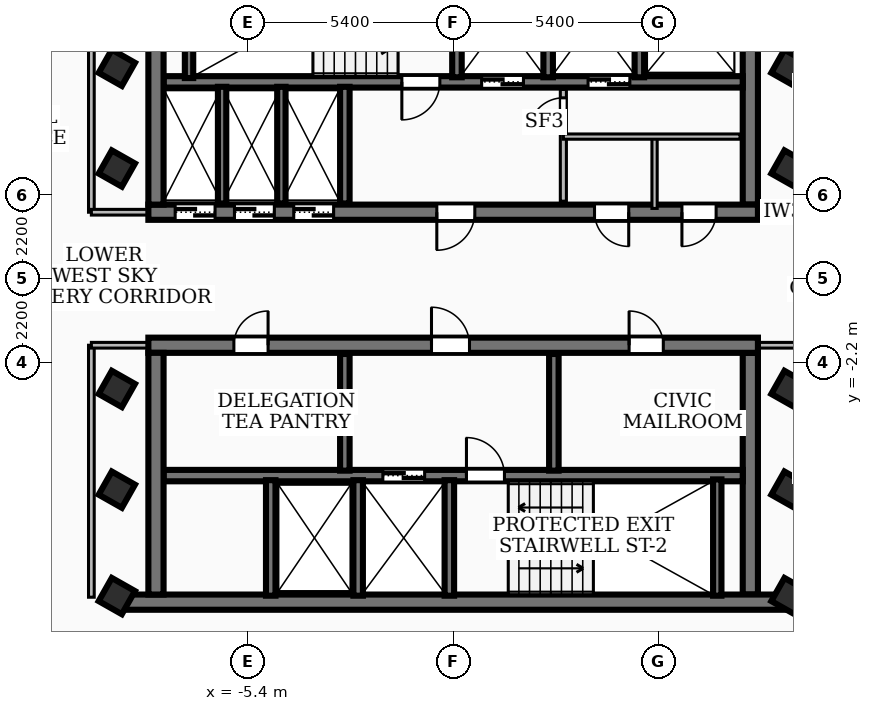
"""IFC4 building model, lengths in metres.
Left out: names, types, materials, properties, quantities, classifications, styles, units other than length and angle.
Written with IfcOpenShell. Run it as: python <this file> out.ifc"""

import sys

from ifc_helpers import new_model, si_unit, direction, frame, frame_2d, origin, origin_2d, place, context, subcontext, project, spatial, rectangle, extrude, element, fill, save


model = new_model("IFC4")
c1 = context("Model", 3, precision=1e-05, world=origin(), true_north=direction((0.0, 1.0)))
c2 = subcontext(c1, "Body", "Model", "MODEL_VIEW")
j1 = project(units=[si_unit("LENGTHUNIT", "METRE"), si_unit("PLANEANGLEUNIT", "RADIAN")], contexts=[c1])
p1 = place(None, origin())
s1 = spatial("IfcSite", under=j1, at=p1, CompositionType="ELEMENT")
p2 = place(p1, origin())
s2 = spatial("IfcBuilding", under=s1, at=p2, CompositionType="ELEMENT")
p3 = place(p2, frame((0.0, 0.0, 278.28)))
s3 = spatial("IfcBuildingStorey", under=s2, at=p3, CompositionType="ELEMENT", Elevation=278.28)
p4 = place(p3, frame((8.02, 1.75, 0.0), z_axis=(0.0, 0.0, 1.0), x_axis=(-1.0, 0.0, 0.0)))
e1 = element("IfcWall", 1, at=p4, inside=s3, PredefinedType="SHEAR", context=c2, shape_type="SweptSolid", body=[
    extrude(rectangle(XDim=16.04, YDim=0.4, at=frame_2d((8.02, 0.0))), origin(), (0.0, 0.0, 1.0), 3.16),
])
p5 = place(p4, frame((7.45, 0.0, 0.0)))
e2 = element("IfcOpeningElement", 2, at=p5, cuts=e1, PredefinedType="OPENING", context=c2, shape_type="SweptSolid", body=[
    extrude(rectangle(XDim=1.0, YDim=2.1, at=frame_2d((0.5, 1.05))), frame((0.0, 0.21, 0.0), z_axis=(0.0, -1.0, 0.0), x_axis=(1.0, 0.0, 0.0)), (0.0, 0.0, 1.0), 0.42),
])
p6 = place(p4, frame((14.285, 0.0, 0.0)))
e3 = element("IfcOpeningElement", 3, at=p6, cuts=e1, PredefinedType="OPENING", context=c2, shape_type="SweptSolid", body=[
    extrude(rectangle(XDim=1.05, YDim=2.15, at=frame_2d((0.525, 1.075))), frame((0.0, 0.21, 0.0), z_axis=(0.0, -1.0, 0.0), x_axis=(1.0, 0.0, 0.0)), (0.0, 0.0, 1.0), 0.42),
])
p7 = place(p4, frame((12.725, 0.0, 0.0)))
e4 = element("IfcOpeningElement", 4, at=p7, cuts=e1, PredefinedType="OPENING", context=c2, shape_type="SweptSolid", body=[
    extrude(rectangle(XDim=1.05, YDim=2.15, at=frame_2d((0.525, 1.075))), frame((0.0, 0.21, 0.0), z_axis=(0.0, -1.0, 0.0), x_axis=(1.0, 0.0, 0.0)), (0.0, 0.0, 1.0), 0.42),
])
p8 = place(p4, frame((11.165, 0.0, 0.0)))
e5 = element("IfcOpeningElement", 5, at=p8, cuts=e1, PredefinedType="OPENING", context=c2, shape_type="SweptSolid", body=[
    extrude(rectangle(XDim=1.05, YDim=2.15, at=frame_2d((0.525, 1.075))), frame((0.0, 0.21, 0.0), z_axis=(0.0, -1.0, 0.0), x_axis=(1.0, 0.0, 0.0)), (0.0, 0.0, 1.0), 0.42),
])
p9 = place(p4, frame((3.4, 0.0, 0.0)))
e6 = element("IfcOpeningElement", 6, at=p9, cuts=e1, PredefinedType="OPENING", context=c2, shape_type="SweptSolid", body=[
    extrude(rectangle(XDim=0.9, YDim=2.06, at=frame_2d((0.45, 1.03))), frame((0.0, 0.21, 0.0), z_axis=(0.0, -1.0, 0.0), x_axis=(1.0, 0.0, 0.0)), (0.0, 0.0, 1.0), 0.42),
])
p10 = place(p4, frame((1.1, 0.0, 0.0)))
e7 = element("IfcOpeningElement", 7, at=p10, cuts=e1, PredefinedType="OPENING", context=c2, shape_type="SweptSolid", body=[
    extrude(rectangle(XDim=0.9, YDim=2.06, at=frame_2d((0.45, 1.03))), frame((0.0, 0.21, 0.0), z_axis=(0.0, -1.0, 0.0), x_axis=(1.0, 0.0, 0.0)), (0.0, 0.0, 1.0), 0.42),
])
for number, where, z_axis, x_axis in (
    (8, (-7.82, 1.95, 0.0), (0.0, 0.0, 1.0), (0.0, 1.0, 0.0)),
    (9, (7.82, 8.31, 0.0), (0.0, 0.0, 1.0), (0.0, -1.0, 0.0)),
):
    element("IfcWall", number, at=place(p3, frame(where, z_axis=z_axis, x_axis=x_axis)), inside=s3, PredefinedType="SHEAR", context=c2, shape_type="SweptSolid", body=[
        extrude(rectangle(XDim=6.36, YDim=0.4, at=frame_2d((3.18, 0.0))), origin(), (0.0, 0.0, 1.0), 3.16),
    ])
p11 = place(p3, frame((7.62, 5.18, 0.0), z_axis=(0.0, 0.0, 1.0), x_axis=(-1.0, 0.0, 0.0)))
e10 = element("IfcWall", 10, at=p11, inside=s3, PredefinedType="SOLIDWALL", context=c2, shape_type="SweptSolid", body=[
    extrude(rectangle(XDim=15.24, YDim=0.3, at=frame_2d((7.62, 0.0))), origin(), (0.0, 0.0, 1.0), 3.16),
])
p12 = place(p11, frame((5.77, 0.0, 0.0)))
e11 = element("IfcOpeningElement", 11, at=p12, cuts=e10, PredefinedType="OPENING", context=c2, shape_type="SweptSolid", body=[
    extrude(rectangle(XDim=1.1, YDim=2.15, at=frame_2d((0.55, 1.075))), frame((0.0, 0.16, 0.0), z_axis=(0.0, -1.0, 0.0), x_axis=(1.0, 0.0, 0.0)), (0.0, 0.0, 1.0), 0.32),
])
p13 = place(p11, frame((2.97, 0.0, 0.0)))
e12 = element("IfcOpeningElement", 12, at=p13, cuts=e10, PredefinedType="OPENING", context=c2, shape_type="SweptSolid", body=[
    extrude(rectangle(XDim=1.1, YDim=2.15, at=frame_2d((0.55, 1.075))), frame((0.0, 0.16, 0.0), z_axis=(0.0, -1.0, 0.0), x_axis=(1.0, 0.0, 0.0)), (0.0, 0.0, 1.0), 0.32),
])
p14 = place(p11, frame((7.97, 0.0, 0.0)))
e13 = element("IfcOpeningElement", 13, at=p14, cuts=e10, PredefinedType="OPENING", context=c2, shape_type="SweptSolid", body=[
    extrude(rectangle(XDim=1.0, YDim=2.1, at=frame_2d((0.5, 1.05))), frame((0.0, 0.16, 0.0), z_axis=(0.0, -1.0, 0.0), x_axis=(1.0, 0.0, 0.0)), (0.0, 0.0, 1.0), 0.32),
])
p15 = place(p3, frame((8.78, -8.51, 0.0), z_axis=(0.0, 0.0, 1.0), x_axis=(-1.0, 0.0, 0.0)))
e14 = element("IfcWall", 14, at=p15, inside=s3, PredefinedType="SHEAR", context=c2, shape_type="SweptSolid", body=[
    extrude(rectangle(XDim=17.56, YDim=0.4, at=frame_2d((8.78, 0.0))), origin(), (0.0, 0.0, 1.0), 3.16),
])
p16 = place(p3, frame((-8.02, -1.75, 0.0), z_axis=(0.0, 0.0, 1.0), x_axis=(1.0, 0.0, 0.0)))
e15 = element("IfcWall", 15, at=p16, inside=s3, PredefinedType="SHEAR", context=c2, shape_type="SweptSolid", body=[
    extrude(rectangle(XDim=16.04, YDim=0.4, at=frame_2d((8.02, 0.0))), origin(), (0.0, 0.0, 1.0), 3.16),
])
p17 = place(p16, frame((7.45, 0.0, 0.0)))
e16 = element("IfcOpeningElement", 16, at=p17, cuts=e15, PredefinedType="OPENING", context=c2, shape_type="SweptSolid", body=[
    extrude(rectangle(XDim=1.0, YDim=2.1, at=frame_2d((0.5, 1.05))), frame((0.0, 0.21, 0.0), z_axis=(0.0, -1.0, 0.0), x_axis=(1.0, 0.0, 0.0)), (0.0, 0.0, 1.0), 0.42),
])
p18 = place(p16, frame((12.65, 0.0, 0.0)))
e17 = element("IfcOpeningElement", 17, at=p18, cuts=e15, PredefinedType="OPENING", context=c2, shape_type="SweptSolid", body=[
    extrude(rectangle(XDim=0.9, YDim=2.06, at=frame_2d((0.45, 1.03))), frame((0.0, 0.21, 0.0), z_axis=(0.0, -1.0, 0.0), x_axis=(1.0, 0.0, 0.0)), (0.0, 0.0, 1.0), 0.42),
])
p19 = place(p16, frame((2.25, 0.0, 0.0)))
e18 = element("IfcOpeningElement", 18, at=p19, cuts=e15, PredefinedType="OPENING", context=c2, shape_type="SweptSolid", body=[
    extrude(rectangle(XDim=0.9, YDim=2.06, at=frame_2d((0.45, 1.03))), frame((0.0, 0.21, 0.0), z_axis=(0.0, -1.0, 0.0), x_axis=(1.0, 0.0, 0.0)), (0.0, 0.0, 1.0), 0.42),
])
for number, where, z_axis, x_axis in (
    (19, (-7.82, -8.31, 0.0), (0.0, 0.0, 1.0), (0.0, 1.0, 0.0)),
    (20, (7.82, -1.95, 0.0), (0.0, 0.0, 1.0), (0.0, -1.0, 0.0)),
):
    element("IfcWall", number, at=place(p3, frame(where, z_axis=z_axis, x_axis=x_axis)), inside=s3, PredefinedType="SHEAR", context=c2, shape_type="SweptSolid", body=[
        extrude(rectangle(XDim=6.36, YDim=0.4, at=frame_2d((3.18, 0.0))), origin(), (0.0, 0.0, 1.0), 3.16),
    ])
p20 = place(p3, frame((-7.62, -5.18, 0.0), z_axis=(0.0, 0.0, 1.0), x_axis=(1.0, 0.0, 0.0)))
e21 = element("IfcWall", 21, at=p20, inside=s3, PredefinedType="SOLIDWALL", context=c2, shape_type="SweptSolid", body=[
    extrude(rectangle(XDim=15.24, YDim=0.3, at=frame_2d((7.62, 0.0))), origin(), (0.0, 0.0, 1.0), 3.16),
])
p21 = place(p20, frame((5.77, 0.0, 0.0)))
e22 = element("IfcOpeningElement", 22, at=p21, cuts=e21, PredefinedType="OPENING", context=c2, shape_type="SweptSolid", body=[
    extrude(rectangle(XDim=1.1, YDim=2.15, at=frame_2d((0.55, 1.075))), frame((0.0, 0.16, 0.0), z_axis=(0.0, -1.0, 0.0), x_axis=(1.0, 0.0, 0.0)), (0.0, 0.0, 1.0), 0.32),
])
p22 = place(p20, frame((7.97, 0.0, 0.0)))
e23 = element("IfcOpeningElement", 23, at=p22, cuts=e21, PredefinedType="OPENING", context=c2, shape_type="SweptSolid", body=[
    extrude(rectangle(XDim=1.0, YDim=2.1, at=frame_2d((0.5, 1.05))), frame((0.0, 0.16, 0.0), z_axis=(0.0, -1.0, 0.0), x_axis=(1.0, 0.0, 0.0)), (0.0, 0.0, 1.0), 0.32),
])
for number, where, z_axis, x_axis in (
    (24, (-6.95, 5.28, 0.0), (0.0, 0.0, 1.0), (0.0, 1.0, 0.0)),
    (25, (6.95, -8.34, 0.0), (0.0, 0.0, 1.0), (0.0, 1.0, 0.0)),
):
    element("IfcWall", number, at=place(p3, frame(where, z_axis=z_axis, x_axis=x_axis)), inside=s3, PredefinedType="SOLIDWALL", context=c2, shape_type="SweptSolid", body=[
        extrude(rectangle(XDim=3.06, YDim=0.22, at=frame_2d((1.53, 0.0))), origin(), (0.0, 0.0, 1.0), 3.16),
    ])
for number, where, z_axis, x_axis in (
    (26, (0.1, 5.3, 0.0), (0.0, 0.0, 1.0), (0.0, 1.0, 0.0)),
    (27, (2.5, 5.3, 0.0), (0.0, 0.0, 1.0), (0.0, 1.0, 0.0)),
    (28, (4.9, 5.3, 0.0), (0.0, 0.0, 1.0), (0.0, 1.0, 0.0)),
):
    element("IfcWall", number, at=place(p3, frame(where, z_axis=z_axis, x_axis=x_axis)), inside=s3, PredefinedType="SOLIDWALL", context=c2, shape_type="SweptSolid", body=[
        extrude(rectangle(XDim=3.04, YDim=0.25, at=frame_2d((1.52, 0.0))), origin(), (0.0, 0.0, 1.0), 3.16),
    ])
p23 = place(p3, frame((-2.85, 1.98, 0.0), z_axis=(0.0, 0.0, 1.0), x_axis=(0.0, 1.0, 0.0)))
e29 = element("IfcWall", 29, at=p23, inside=s3, PredefinedType="SOLIDWALL", context=c2, shape_type="SweptSolid", body=[
    extrude(rectangle(XDim=3.07, YDim=0.25, at=frame_2d((1.535, 0.0))), origin(), (0.0, 0.0, 1.0), 3.16),
])
for number, where, z_axis, x_axis in (
    (30, (-0.1, -8.34, 0.0), (0.0, 0.0, 1.0), (0.0, 1.0, 0.0)),
    (31, (-2.5, -8.34, 0.0), (0.0, 0.0, 1.0), (0.0, 1.0, 0.0)),
    (32, (-4.8, -8.34, 0.0), (0.0, 0.0, 1.0), (0.0, 1.0, 0.0)),
):
    element("IfcWall", number, at=place(p3, frame(where, z_axis=z_axis, x_axis=x_axis)), inside=s3, PredefinedType="SOLIDWALL", context=c2, shape_type="SweptSolid", body=[
        extrude(rectangle(XDim=3.04, YDim=0.25, at=frame_2d((1.52, 0.0))), origin(), (0.0, 0.0, 1.0), 3.16),
    ])
for number, where, z_axis, x_axis in (
    (33, (-2.85, -5.05, 0.0), (0.0, 0.0, 1.0), (0.0, 1.0, 0.0)),
    (34, (2.65, -5.05, 0.0), (0.0, 0.0, 1.0), (0.0, 1.0, 0.0)),
):
    element("IfcWall", number, at=place(p3, frame(where, z_axis=z_axis, x_axis=x_axis)), inside=s3, PredefinedType="SOLIDWALL", context=c2, shape_type="SweptSolid", body=[
        extrude(rectangle(XDim=3.07, YDim=0.25, at=frame_2d((1.535, 0.0))), origin(), (0.0, 0.0, 1.0), 3.16),
    ])
for number, where, z_axis, x_axis in (
    (35, (-6.08, 1.98, 0.0), (0.0, 0.0, 1.0), (0.0, 1.0, 0.0)),
    (36, (-4.52, 1.98, 0.0), (0.0, 0.0, 1.0), (0.0, 1.0, 0.0)),
):
    element("IfcWall", number, at=place(p3, frame(where, z_axis=z_axis, x_axis=x_axis)), inside=s3, PredefinedType="SOLIDWALL", context=c2, shape_type="SweptSolid", body=[
        extrude(rectangle(XDim=3.07, YDim=0.22, at=frame_2d((1.535, 0.0))), origin(), (0.0, 0.0, 1.0), 3.16),
    ])
for number, where, z_axis, x_axis in (
    (37, (-8.85, -5.55, 0.0), (0.0, 0.0, 1.0), (0.493, 0.87, 0.0)),
    (38, (-8.85, -2.9, 0.0), (0.0, 0.0, 1.0), (0.493, 0.87, 0.0)),
    (39, (-8.85, 2.9, 0.0), (0.0, 0.0, 1.0), (0.493, 0.87, 0.0)),
    (40, (-8.85, 5.55, 0.0), (0.0, 0.0, 1.0), (0.493, 0.87, 0.0)),
    (41, (8.85, -5.55, 0.0), (0.0, 0.0, 1.0), (0.493, 0.87, 0.0)),
    (42, (8.85, -2.9, 0.0), (0.0, 0.0, 1.0), (0.493, 0.87, 0.0)),
    (43, (8.85, 2.9, 0.0), (0.0, 0.0, 1.0), (0.493, 0.87, 0.0)),
    (44, (8.85, 5.55, 0.0), (0.0, 0.0, 1.0), (0.493, 0.87, 0.0)),
    (45, (8.85, -8.35, 0.0), (0.0, 0.0, 1.0), (0.493, 0.87, 0.0)),
    (46, (-8.85, -8.35, 0.0), (0.0, 0.0, 1.0), (0.493, 0.87, 0.0)),
):
    element("IfcColumn", number, at=place(p3, frame(where, z_axis=z_axis, x_axis=x_axis)), inside=s3, PredefinedType="COLUMN", context=c2, shape_type="SweptSolid", body=[
        extrude(rectangle(XDim=0.7, YDim=0.7, at=origin_2d()), origin(), (0.0, 0.0, 1.0), 3.42),
    ])
p24 = place(p3, frame((2.9, 2.04, 0.0), z_axis=(0.0, 0.0, 1.0), x_axis=(0.0, 1.0, 0.0)))
e47 = element("IfcWall", 47, at=p24, inside=s3, PredefinedType="PARTITIONING", context=c2, shape_type="SweptSolid", body=[
    extrude(rectangle(XDim=2.94, YDim=0.16, at=frame_2d((1.47, 0.0))), origin(), (0.0, 0.0, 1.0), 2.39),
])
p25 = place(p24, frame((1.82, 0.0, 0.0)))
e48 = element("IfcOpeningElement", 48, at=p25, cuts=e47, PredefinedType="OPENING", context=c2, shape_type="SweptSolid", body=[
    extrude(rectangle(XDim=0.9, YDim=2.06, at=frame_2d((0.45, 1.03))), frame((0.0, 0.09, 0.0), z_axis=(0.0, -1.0, 0.0), x_axis=(1.0, 0.0, 0.0)), (0.0, 0.0, 1.0), 0.18),
])
p26 = place(p3, frame((2.9, 3.74, 0.0), z_axis=(0.0, 0.0, 1.0), x_axis=(1.0, 0.0, 0.0)))
e49 = element("IfcWall", 49, at=p26, inside=s3, PredefinedType="PARTITIONING", context=c2, shape_type="SweptSolid", body=[
    extrude(rectangle(XDim=4.65, YDim=0.138, at=frame_2d((2.325, 0.0))), origin(), (0.0, 0.0, 1.0), 3.16),
])
p27 = place(p3, frame((5.3, 1.85, 0.0), z_axis=(0.0, 0.0, 1.0), x_axis=(0.0, 1.0, 0.0)))
e50 = element("IfcWall", 50, at=p27, inside=s3, PredefinedType="PARTITIONING", context=c2, shape_type="SweptSolid", body=[
    extrude(rectangle(XDim=1.89, YDim=0.138, at=frame_2d((0.945, 0.0))), origin(), (0.0, 0.0, 1.0), 2.39),
])
p28 = place(p3, frame((-9.52, 1.75, 0.0), z_axis=(0.0, 0.0, 1.0), x_axis=(0.0, 1.0, 0.0)))
e51 = element("IfcWall", 51, at=p28, inside=s3, PredefinedType="PARTITIONING", context=c2, shape_type="SweptSolid", body=[
    extrude(rectangle(XDim=6.63, YDim=0.15, at=frame_2d((3.315, 0.0))), origin(), (0.0, 0.0, 1.0), 2.53),
])
p29 = place(p3, frame((-7.85, 1.75, 0.0), z_axis=(0.0, 0.0, 1.0), x_axis=(-1.0, 0.0, 0.0)))
e52 = element("IfcWall", 52, at=p29, inside=s3, PredefinedType="PARTITIONING", context=c2, shape_type="SweptSolid", body=[
    extrude(rectangle(XDim=1.67, YDim=0.15, at=frame_2d((0.835, 0.0))), origin(), (0.0, 0.0, 1.0), 2.39),
])
p30 = place(p3, frame((-9.52, -8.38, 0.0), z_axis=(0.0, 0.0, 1.0), x_axis=(0.0, 1.0, 0.0)))
e53 = element("IfcWall", 53, at=p30, inside=s3, PredefinedType="PARTITIONING", context=c2, shape_type="SweptSolid", body=[
    extrude(rectangle(XDim=6.63, YDim=0.15, at=frame_2d((3.315, 0.0))), origin(), (0.0, 0.0, 1.0), 3.16),
])
for number, where, z_axis, x_axis in (
    (54, (-7.85, -1.75, 0.0), (0.0, 0.0, 1.0), (-1.0, 0.0, 0.0)),
    (55, (7.85, 1.75, 0.0), (0.0, 0.0, 1.0), (1.0, 0.0, 0.0)),
    (56, (7.85, -1.75, 0.0), (0.0, 0.0, 1.0), (1.0, 0.0, 0.0)),
):
    element("IfcWall", number, at=place(p3, frame(where, z_axis=z_axis, x_axis=x_axis)), inside=s3, PredefinedType="PARTITIONING", context=c2, shape_type="SweptSolid", body=[
        extrude(rectangle(XDim=1.67, YDim=0.15, at=frame_2d((0.835, 0.0))), origin(), (0.0, 0.0, 1.0), 2.39),
    ])
p31 = place(p3, frame((-17.619, -2.113, 0.0), z_axis=(0.0, 0.0, 1.0), x_axis=(0.492746831558, 0.870172718482, 0.0)))
e57 = element("IfcWall", 57, at=p31, inside=s3, PredefinedType="PARTITIONING", context=c2, shape_type="SweptSolid", body=[
    extrude(rectangle(XDim=20.54, YDim=0.11, at=frame_2d((10.27, 0.0))), origin(), (0.0, 0.0, 1.0), 2.53),
])
p32 = place(p31, frame((11.36, 0.0, 0.0)))
e58 = element("IfcOpeningElement", 58, at=p32, cuts=e57, PredefinedType="OPENING", context=c2, shape_type="SweptSolid", body=[
    extrude(rectangle(XDim=0.86, YDim=2.04, at=frame_2d((0.43, 1.02))), frame((0.0, 0.065, 0.0), z_axis=(0.0, -1.0, 0.0), x_axis=(1.0, 0.0, 0.0)), (0.0, 0.0, 1.0), 0.13),
])
p33 = place(p31, frame((9.92, 0.0, 0.0)))
e59 = element("IfcOpeningElement", 59, at=p33, cuts=e57, PredefinedType="OPENING", context=c2, shape_type="SweptSolid", body=[
    extrude(rectangle(XDim=0.86, YDim=2.04, at=frame_2d((0.43, 1.02))), frame((0.0, 0.065, 0.0), z_axis=(0.0, -1.0, 0.0), x_axis=(1.0, 0.0, 0.0)), (0.0, 0.0, 1.0), 0.13),
])
p34 = place(p3, frame((17.619, 2.113, 0.0), z_axis=(0.0, 0.0, 1.0), x_axis=(-0.492746831558, -0.870172718482, 0.0)))
e60 = element("IfcWall", 60, at=p34, inside=s3, PredefinedType="PARTITIONING", context=c2, shape_type="SweptSolid", body=[
    extrude(rectangle(XDim=20.54, YDim=0.11, at=frame_2d((10.27, 0.0))), origin(), (0.0, 0.0, 1.0), 2.53),
])
p35 = place(p34, frame((11.36, 0.0, 0.0)))
e61 = element("IfcOpeningElement", 61, at=p35, cuts=e60, PredefinedType="OPENING", context=c2, shape_type="SweptSolid", body=[
    extrude(rectangle(XDim=0.86, YDim=2.04, at=frame_2d((0.43, 1.02))), frame((0.0, 0.065, 0.0), z_axis=(0.0, -1.0, 0.0), x_axis=(1.0, 0.0, 0.0)), (0.0, 0.0, 1.0), 0.13),
])
p36 = place(p34, frame((9.92, 0.0, 0.0)))
e62 = element("IfcOpeningElement", 62, at=p36, cuts=e60, PredefinedType="OPENING", context=c2, shape_type="SweptSolid", body=[
    extrude(rectangle(XDim=0.86, YDim=2.04, at=frame_2d((0.43, 1.02))), frame((0.0, 0.065, 0.0), z_axis=(0.0, -1.0, 0.0), x_axis=(1.0, 0.0, 0.0)), (0.0, 0.0, 1.0), 0.13),
])
p37 = place(p5, origin())
e63 = element("IfcDoor", 63, at=p37, inside=s3, OperationType="SINGLE_SWING_RIGHT", PredefinedType="DOOR", context=c2, shape_type="SweptSolid", body=[
    extrude(rectangle(XDim=1.0, YDim=2.1, at=frame_2d((0.5, 1.05))), frame((0.0, 0.025, 0.0), z_axis=(0.0, -1.0, 0.0), x_axis=(1.0, 0.0, 0.0)), (0.0, 0.0, 1.0), 0.05),
])
fill(e2, e63)
p38 = place(p17, origin())
e64 = element("IfcDoor", 64, at=p38, inside=s3, OperationType="SINGLE_SWING_LEFT", PredefinedType="DOOR", context=c2, shape_type="SweptSolid", body=[
    extrude(rectangle(XDim=1.0, YDim=2.1, at=frame_2d((0.5, 1.05))), frame((0.0, 0.025, 0.0), z_axis=(0.0, -1.0, 0.0), x_axis=(1.0, 0.0, 0.0)), (0.0, 0.0, 1.0), 0.05),
])
fill(e16, e64)
p39 = place(p12, origin())
e65 = element("IfcDoor", 65, at=p39, inside=s3, OperationType="DOUBLE_DOOR_SLIDING", PredefinedType="DOOR", context=c2, shape_type="SweptSolid", body=[
    extrude(rectangle(XDim=1.1, YDim=2.15, at=frame_2d((0.55, 1.075))), frame((0.0, 0.025, 0.0), z_axis=(0.0, -1.0, 0.0), x_axis=(1.0, 0.0, 0.0)), (0.0, 0.0, 1.0), 0.05),
])
fill(e11, e65)
p40 = place(p13, origin())
e66 = element("IfcDoor", 66, at=p40, inside=s3, OperationType="DOUBLE_DOOR_SLIDING", PredefinedType="DOOR", context=c2, shape_type="SweptSolid", body=[
    extrude(rectangle(XDim=1.1, YDim=2.15, at=frame_2d((0.55, 1.075))), frame((0.0, 0.025, 0.0), z_axis=(0.0, -1.0, 0.0), x_axis=(1.0, 0.0, 0.0)), (0.0, 0.0, 1.0), 0.05),
])
fill(e12, e66)
p41 = place(p14, origin())
e67 = element("IfcDoor", 67, at=p41, inside=s3, OperationType="SINGLE_SWING_RIGHT", PredefinedType="DOOR", context=c2, shape_type="SweptSolid", body=[
    extrude(rectangle(XDim=1.0, YDim=2.1, at=frame_2d((0.5, 1.05))), frame((0.0, 0.025, 0.0), z_axis=(0.0, -1.0, 0.0), x_axis=(1.0, 0.0, 0.0)), (0.0, 0.0, 1.0), 0.05),
])
fill(e13, e67)
p42 = place(p21, origin())
e68 = element("IfcDoor", 68, at=p42, inside=s3, OperationType="DOUBLE_DOOR_SLIDING", PredefinedType="DOOR", context=c2, shape_type="SweptSolid", body=[
    extrude(rectangle(XDim=1.1, YDim=2.15, at=frame_2d((0.55, 1.075))), frame((0.0, 0.025, 0.0), z_axis=(0.0, -1.0, 0.0), x_axis=(1.0, 0.0, 0.0)), (0.0, 0.0, 1.0), 0.05),
])
fill(e22, e68)
p43 = place(p22, origin())
e69 = element("IfcDoor", 69, at=p43, inside=s3, OperationType="SINGLE_SWING_LEFT", PredefinedType="DOOR", context=c2, shape_type="SweptSolid", body=[
    extrude(rectangle(XDim=1.0, YDim=2.1, at=frame_2d((0.5, 1.05))), frame((0.0, 0.025, 0.0), z_axis=(0.0, -1.0, 0.0), x_axis=(1.0, 0.0, 0.0)), (0.0, 0.0, 1.0), 0.05),
])
fill(e23, e69)
p44 = place(p6, origin())
e70 = element("IfcDoor", 70, at=p44, inside=s3, OperationType="DOUBLE_DOOR_SLIDING", PredefinedType="DOOR", context=c2, shape_type="SweptSolid", body=[
    extrude(rectangle(XDim=1.05, YDim=2.15, at=frame_2d((0.525, 1.075))), frame((0.0, 0.025, 0.0), z_axis=(0.0, -1.0, 0.0), x_axis=(1.0, 0.0, 0.0)), (0.0, 0.0, 1.0), 0.05),
])
fill(e3, e70)
p45 = place(p7, origin())
e71 = element("IfcDoor", 71, at=p45, inside=s3, OperationType="DOUBLE_DOOR_SLIDING", PredefinedType="DOOR", context=c2, shape_type="SweptSolid", body=[
    extrude(rectangle(XDim=1.05, YDim=2.15, at=frame_2d((0.525, 1.075))), frame((0.0, 0.025, 0.0), z_axis=(0.0, -1.0, 0.0), x_axis=(1.0, 0.0, 0.0)), (0.0, 0.0, 1.0), 0.05),
])
fill(e4, e71)
p46 = place(p8, origin())
e72 = element("IfcDoor", 72, at=p46, inside=s3, OperationType="DOUBLE_DOOR_SLIDING", PredefinedType="DOOR", context=c2, shape_type="SweptSolid", body=[
    extrude(rectangle(XDim=1.05, YDim=2.15, at=frame_2d((0.525, 1.075))), frame((0.0, 0.025, 0.0), z_axis=(0.0, -1.0, 0.0), x_axis=(1.0, 0.0, 0.0)), (0.0, 0.0, 1.0), 0.05),
])
fill(e5, e72)
p47 = place(p18, origin())
e73 = element("IfcDoor", 73, at=p47, inside=s3, OperationType="SINGLE_SWING_LEFT", PredefinedType="DOOR", context=c2, shape_type="SweptSolid", body=[
    extrude(rectangle(XDim=0.9, YDim=2.06, at=frame_2d((0.45, 1.03))), frame((0.0, 0.025, 0.0), z_axis=(0.0, -1.0, 0.0), x_axis=(1.0, 0.0, 0.0)), (0.0, 0.0, 1.0), 0.05),
])
fill(e17, e73)
p48 = place(p19, origin())
e74 = element("IfcDoor", 74, at=p48, inside=s3, OperationType="SINGLE_SWING_RIGHT", PredefinedType="DOOR", context=c2, shape_type="SweptSolid", body=[
    extrude(rectangle(XDim=0.9, YDim=2.06, at=frame_2d((0.45, 1.03))), frame((0.0, 0.025, 0.0), z_axis=(0.0, -1.0, 0.0), x_axis=(1.0, 0.0, 0.0)), (0.0, 0.0, 1.0), 0.05),
])
fill(e18, e74)
p49 = place(p9, origin())
e75 = element("IfcDoor", 75, at=p49, inside=s3, OperationType="SINGLE_SWING_LEFT", PredefinedType="DOOR", context=c2, shape_type="SweptSolid", body=[
    extrude(rectangle(XDim=0.9, YDim=2.06, at=frame_2d((0.45, 1.03))), frame((0.0, 0.025, 0.0), z_axis=(0.0, -1.0, 0.0), x_axis=(1.0, 0.0, 0.0)), (0.0, 0.0, 1.0), 0.05),
])
fill(e6, e75)
p50 = place(p10, origin())
e76 = element("IfcDoor", 76, at=p50, inside=s3, OperationType="SINGLE_SWING_RIGHT", PredefinedType="DOOR", context=c2, shape_type="SweptSolid", body=[
    extrude(rectangle(XDim=0.9, YDim=2.06, at=frame_2d((0.45, 1.03))), frame((0.0, 0.025, 0.0), z_axis=(0.0, -1.0, 0.0), x_axis=(1.0, 0.0, 0.0)), (0.0, 0.0, 1.0), 0.05),
])
fill(e7, e76)
p51 = place(p25, origin())
e77 = element("IfcDoor", 77, at=p51, inside=s3, OperationType="SINGLE_SWING_LEFT", PredefinedType="DOOR", context=c2, shape_type="SweptSolid", body=[
    extrude(rectangle(XDim=0.9, YDim=2.06, at=frame_2d((0.45, 1.03))), frame((0.0, 0.025, 0.0), z_axis=(0.0, -1.0, 0.0), x_axis=(1.0, 0.0, 0.0)), (0.0, 0.0, 1.0), 0.05),
])
fill(e48, e77)
save(model, sys.argv[1])
